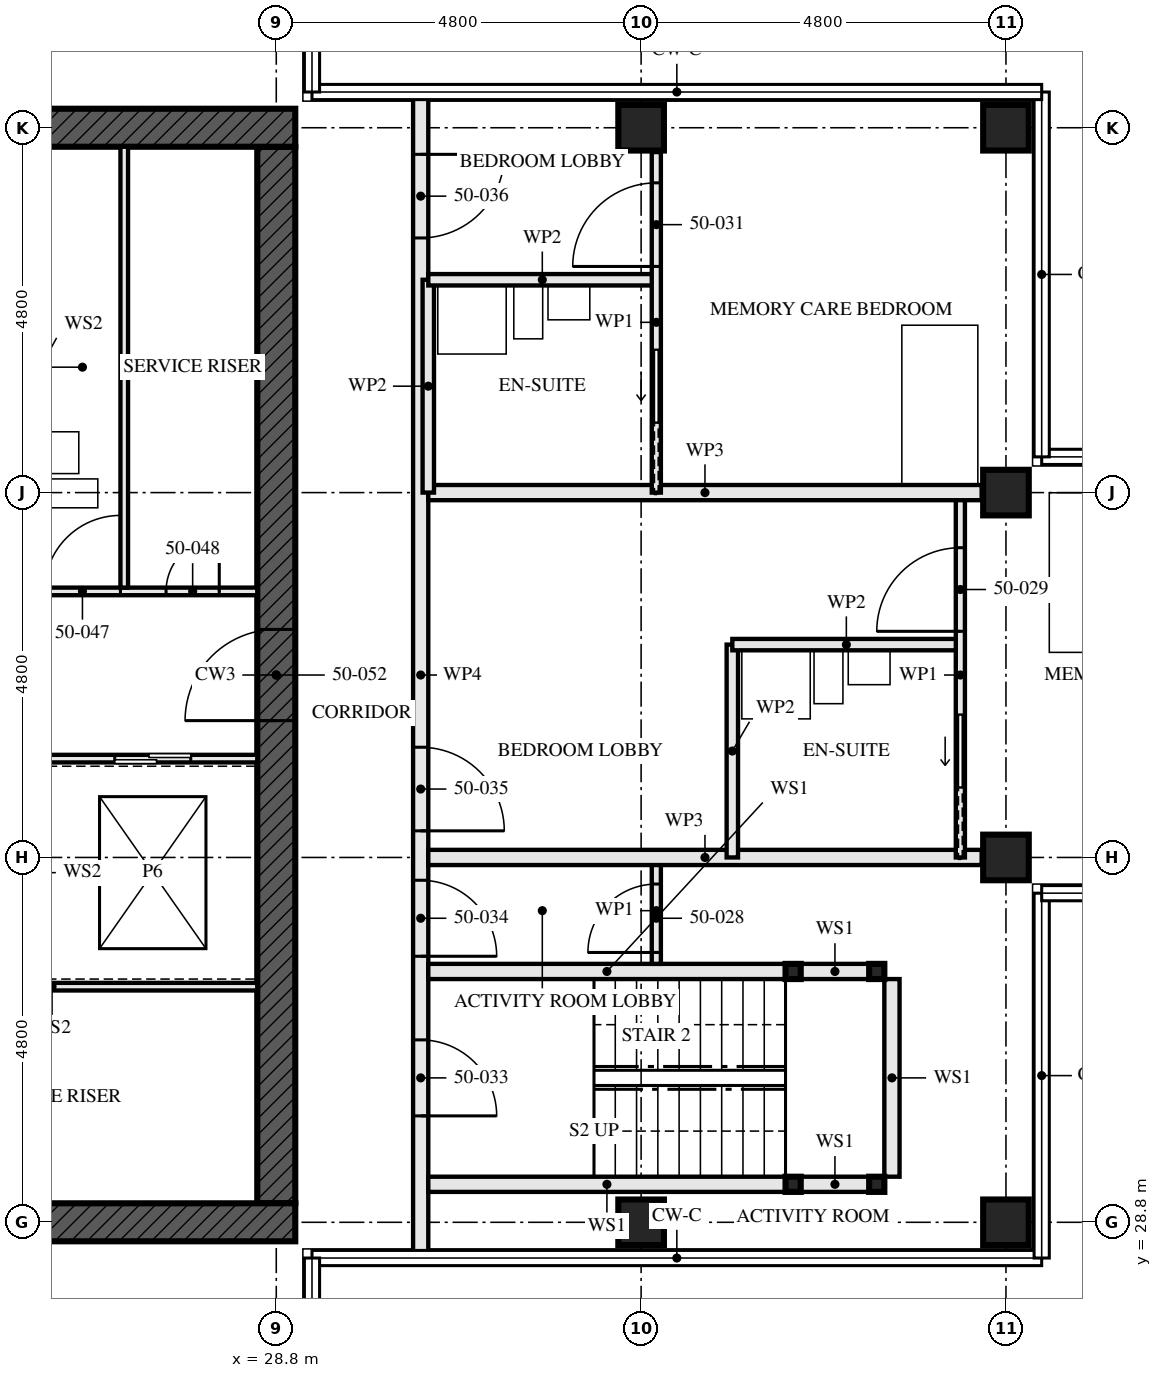
"""IFC4 building model, lengths in metres.
Left out: names, types, materials, properties, quantities, classifications, styles, units other than length and angle.
Written with IfcOpenShell. Run it as: python <this file> out.ifc"""

import sys

from ifc_helpers import new_model, si_unit, direction, frame, frame_2d, origin, origin_2d, place, context, subcontext, project, spatial, rectangle, hollow_rectangle, extrude, element, fill, save


model = new_model("IFC4")
c1 = context("Model", 3, precision=1e-05, world=origin(), true_north=direction((0.0, 1.0)))
c2 = subcontext(c1, "Body", "Model", "MODEL_VIEW")
j1 = project(units=[si_unit("LENGTHUNIT", "METRE"), si_unit("PLANEANGLEUNIT", "RADIAN")], contexts=[c1])
p1 = place(None, origin())
s1 = spatial("IfcSite", under=j1, at=p1, CompositionType="ELEMENT")
p2 = place(p1, origin())
s2 = spatial("IfcBuilding", under=s1, at=p2, CompositionType="ELEMENT")
p3 = place(p2, frame((0.0, 0.0, 183.0)))
s3 = spatial("IfcBuildingStorey", under=s2, at=p3, CompositionType="ELEMENT", Elevation=183.0)
for number, where, z_axis, x_axis in (
    (1, (33.6, 28.8, 0.0), (0.0, 0.0, 1.0), (0.0, 1.0, 0.0)),
    (2, (33.6, 43.2, 0.0), (0.0, 0.0, 1.0), (0.0, 1.0, 0.0)),
    (3, (38.4, 28.8, 0.0), (0.0, 0.0, 1.0), (0.0, 1.0, 0.0)),
    (4, (38.4, 33.6, 0.0), (0.0, 0.0, 1.0), (0.0, 1.0, 0.0)),
    (5, (38.4, 38.4, 0.0), (0.0, 0.0, 1.0), (0.0, 1.0, 0.0)),
    (6, (38.4, 43.2, 0.0), (0.0, 0.0, 1.0), (0.0, 1.0, 0.0)),
):
    element("IfcColumn", number, at=place(p3, frame(where, z_axis=z_axis, x_axis=x_axis)), inside=s3, PredefinedType="COLUMN", context=c2, shape_type="SweptSolid", body=[
        extrude(hollow_rectangle(XDim=0.6, YDim=0.6, WallThickness=0.08, at=origin_2d()), origin(), (0.0, 0.0, 1.0), 3.5),
    ])
p4 = place(p3, frame((14.15, 28.8, -0.17), z_axis=(0.0, 0.0, 1.0), x_axis=(1.0, 0.0, 0.0)))
e7 = element("IfcWall", 7, at=p4, inside=s3, PredefinedType="SHEAR", context=c2, shape_type="SweptSolid", body=[
    extrude(rectangle(XDim=14.9, YDim=0.5, at=frame_2d((7.45, 0.0))), origin(), (0.0, 0.0, 1.0), 3.5),
])
p5 = place(p4, frame((6.85, 0.0, 0.17)))
e8 = element("IfcOpeningElement", 8, at=p5, cuts=e7, PredefinedType="OPENING", context=c2, shape_type="SweptSolid", body=[
    extrude(rectangle(XDim=1.2, YDim=2.1, at=frame_2d((0.6, 1.05))), frame((0.0, 0.26, 0.0), z_axis=(0.0, -1.0, 0.0), x_axis=(1.0, 0.0, 0.0)), (0.0, 0.0, 1.0), 0.521),
])
p6 = place(p3, frame((29.05, 43.2, -0.17), z_axis=(0.0, 0.0, 1.0), x_axis=(-1.0, 0.0, 0.0)))
e9 = element("IfcWall", 9, at=p6, inside=s3, PredefinedType="SHEAR", context=c2, shape_type="SweptSolid", body=[
    extrude(rectangle(XDim=14.9, YDim=0.5, at=frame_2d((7.45, 0.0))), origin(), (0.0, 0.0, 1.0), 3.5),
])
p7 = place(p6, frame((6.85, 0.0, 0.17)))
e10 = element("IfcOpeningElement", 10, at=p7, cuts=e9, PredefinedType="OPENING", context=c2, shape_type="SweptSolid", body=[
    extrude(rectangle(XDim=1.2, YDim=2.1, at=frame_2d((0.6, 1.05))), frame((0.0, 0.26, 0.0), z_axis=(0.0, -1.0, 0.0), x_axis=(1.0, 0.0, 0.0)), (0.0, 0.0, 1.0), 0.521),
])
p8 = place(p3, frame((28.8, 29.05, -0.17), z_axis=(0.0, 0.0, 1.0), x_axis=(0.0, 1.0, 0.0)))
e11 = element("IfcWall", 11, at=p8, inside=s3, PredefinedType="SHEAR", context=c2, shape_type="SweptSolid", body=[
    extrude(rectangle(XDim=13.9, YDim=0.5, at=frame_2d((6.95, 0.0))), origin(), (0.0, 0.0, 1.0), 3.5),
])
p9 = place(p8, frame((6.35, 0.0, 0.17)))
e12 = element("IfcOpeningElement", 12, at=p9, cuts=e11, PredefinedType="OPENING", context=c2, shape_type="SweptSolid", body=[
    extrude(rectangle(XDim=1.2, YDim=2.1, at=frame_2d((0.6, 1.05))), frame((0.0, 0.26, 0.0), z_axis=(0.0, -1.0, 0.0), x_axis=(1.0, 0.0, 0.0)), (0.0, 0.0, 1.0), 0.521),
])
for number, where, z_axis, x_axis in (
    (13, (36.7, 29.3, 0.0), (0.0, 0.0, 1.0), (1.0, 0.0, 0.0)),
    (14, (36.7, 32.1, 0.0), (0.0, 0.0, 1.0), (1.0, 0.0, 0.0)),
    (15, (35.6, 29.3, 0.0), (0.0, 0.0, 1.0), (1.0, 0.0, 0.0)),
    (16, (35.6, 32.1, 0.0), (0.0, 0.0, 1.0), (1.0, 0.0, 0.0)),
):
    element("IfcColumn", number, at=place(p3, frame(where, z_axis=z_axis, x_axis=x_axis)), inside=s3, PredefinedType="COLUMN", context=c2, shape_type="SweptSolid", body=[
        extrude(hollow_rectangle(XDim=0.2, YDim=0.2, WallThickness=0.008, at=origin_2d()), origin(), (0.0, 0.0, 1.0), 3.33),
    ])
p10 = place(p3, frame((36.6, 29.3, 0.0), z_axis=(0.0, 0.0, 1.0), x_axis=(-1.0, 0.0, 0.0)))
e17 = element("IfcWall", 17, at=p10, inside=s3, PredefinedType="SOLIDWALL", context=c2, shape_type="SweptSolid", body=[
    extrude(rectangle(XDim=0.9, YDim=0.2, at=frame_2d((0.45, 0.0))), origin(), (0.0, 0.0, 1.0), 2.99),
])
p11 = place(p3, frame((35.5, 29.3, 0.0), z_axis=(0.0, 0.0, 1.0), x_axis=(-1.0, 0.0, 0.0)))
e18 = element("IfcWall", 18, at=p11, inside=s3, PredefinedType="SOLIDWALL", context=c2, shape_type="SweptSolid", body=[
    extrude(rectangle(XDim=4.7, YDim=0.2, at=frame_2d((2.35, 0.0))), origin(), (0.0, 0.0, 1.0), 2.99),
])
p12 = place(p3, frame((36.6, 32.1, 0.0), z_axis=(0.0, 0.0, 1.0), x_axis=(-1.0, 0.0, 0.0)))
e19 = element("IfcWall", 19, at=p12, inside=s3, PredefinedType="SOLIDWALL", context=c2, shape_type="SweptSolid", body=[
    extrude(rectangle(XDim=0.9, YDim=0.2, at=frame_2d((0.45, 0.0))), origin(), (0.0, 0.0, 1.0), 2.99),
])
p13 = place(p3, frame((35.5, 32.1, 0.0), z_axis=(0.0, 0.0, 1.0), x_axis=(-1.0, 0.0, 0.0)))
e20 = element("IfcWall", 20, at=p13, inside=s3, PredefinedType="SOLIDWALL", context=c2, shape_type="SweptSolid", body=[
    extrude(rectangle(XDim=4.7, YDim=0.2, at=frame_2d((2.35, 0.0))), origin(), (0.0, 0.0, 1.0), 2.99),
])
p14 = place(p3, frame((36.9, 29.4, 0.0), z_axis=(0.0, 0.0, 1.0), x_axis=(0.0, 1.0, 0.0)))
e21 = element("IfcWall", 21, at=p14, inside=s3, PredefinedType="SOLIDWALL", context=c2, shape_type="SweptSolid", body=[
    extrude(rectangle(XDim=2.6, YDim=0.2, at=frame_2d((1.3, 0.0))), origin(), (0.0, 0.0, 1.0), 3.33),
])
p15 = place(p3, frame((33.8, 32.2, 0.0), z_axis=(0.0, 0.0, 1.0), x_axis=(0.0, 1.0, 0.0)))
e22 = element("IfcWall", 22, at=p15, inside=s3, PredefinedType="PARTITIONING", context=c2, shape_type="SweptSolid", body=[
    extrude(rectangle(XDim=1.4, YDim=0.12, at=frame_2d((0.7, 0.0))), origin(), (0.0, 0.0, 1.0), 3.33),
])
p16 = place(p15, frame((0.15, 0.0, 0.0)))
e23 = element("IfcOpeningElement", 23, at=p16, cuts=e22, PredefinedType="OPENING", context=c2, shape_type="SweptSolid", body=[
    extrude(rectangle(XDim=0.9, YDim=2.1, at=frame_2d((0.45, 1.05))), frame((0.0, 0.071, 0.0), z_axis=(0.0, -1.0, 0.0), x_axis=(1.0, 0.0, 0.0)), (0.0, 0.0, 1.0), 0.141),
])
p17 = place(p3, frame((38.08, 33.6, 0.0), z_axis=(0.0, 0.0, 1.0), x_axis=(-1.0, 0.0, 0.0)))
e24 = element("IfcWall", 24, at=p17, inside=s3, PredefinedType="PARTITIONING", context=c2, shape_type="SweptSolid", body=[
    extrude(rectangle(XDim=7.28, YDim=0.2, at=frame_2d((3.64, 0.0))), origin(), (0.0, 0.0, 1.0), 2.55),
])
p18 = place(p3, frame((37.8, 36.4, 0.0), z_axis=(0.0, 0.0, 1.0), x_axis=(-1.0, 0.0, 0.0)))
e25 = element("IfcWall", 25, at=p18, inside=s3, PredefinedType="PARTITIONING", context=c2, shape_type="SweptSolid", body=[
    extrude(rectangle(XDim=3.0, YDim=0.15, at=frame_2d((1.5, 0.0))), origin(), (0.0, 0.0, 1.0), 3.33),
])
p19 = place(p3, frame((34.8, 33.6, 0.0), z_axis=(0.0, 0.0, 1.0), x_axis=(0.0, 1.0, 0.0)))
e26 = element("IfcWall", 26, at=p19, inside=s3, PredefinedType="PARTITIONING", context=c2, shape_type="SweptSolid", body=[
    extrude(rectangle(XDim=2.8, YDim=0.15, at=frame_2d((1.4, 0.0))), origin(), (0.0, 0.0, 1.0), 3.33),
])
p20 = place(p3, frame((37.8, 33.6, 0.0), z_axis=(0.0, 0.0, 1.0), x_axis=(0.0, 1.0, 0.0)))
e27 = element("IfcWall", 27, at=p20, inside=s3, PredefinedType="PARTITIONING", context=c2, shape_type="SweptSolid", body=[
    extrude(rectangle(XDim=4.8, YDim=0.12, at=frame_2d((2.4, 0.0))), origin(), (0.0, 0.0, 1.0), 3.33),
])
p21 = place(p20, frame((2.975, 0.0, 0.0)))
e28 = element("IfcOpeningElement", 28, at=p21, cuts=e27, PredefinedType="OPENING", context=c2, shape_type="SweptSolid", body=[
    extrude(rectangle(XDim=1.1, YDim=2.1, at=frame_2d((0.55, 1.05))), frame((0.0, 0.071, 0.0), z_axis=(0.0, -1.0, 0.0), x_axis=(1.0, 0.0, 0.0)), (0.0, 0.0, 1.0), 0.141),
])
p22 = place(p20, frame((0.925, 0.0, 0.0)))
e29 = element("IfcOpeningElement", 29, at=p22, cuts=e27, PredefinedType="OPENING", context=c2, shape_type="SweptSolid", body=[
    extrude(rectangle(XDim=0.95, YDim=2.1, at=frame_2d((0.475, 1.05))), frame((0.0, 0.071, 0.0), z_axis=(0.0, -1.0, 0.0), x_axis=(1.0, 0.0, 0.0)), (0.0, 0.0, 1.0), 0.141),
])
p23 = place(p3, frame((38.08, 38.4, 0.0), z_axis=(0.0, 0.0, 1.0), x_axis=(-1.0, 0.0, 0.0)))
e30 = element("IfcWall", 30, at=p23, inside=s3, PredefinedType="PARTITIONING", context=c2, shape_type="SweptSolid", body=[
    extrude(rectangle(XDim=7.28, YDim=0.2, at=frame_2d((3.64, 0.0))), origin(), (0.0, 0.0, 1.0), 2.55),
])
p24 = place(p3, frame((33.8, 41.2, 0.0), z_axis=(0.0, 0.0, 1.0), x_axis=(-1.0, 0.0, 0.0)))
e31 = element("IfcWall", 31, at=p24, inside=s3, PredefinedType="PARTITIONING", context=c2, shape_type="SweptSolid", body=[
    extrude(rectangle(XDim=3.0, YDim=0.15, at=frame_2d((1.5, 0.0))), origin(), (0.0, 0.0, 1.0), 3.33),
])
p25 = place(p3, frame((30.8, 38.4, 0.0), z_axis=(0.0, 0.0, 1.0), x_axis=(0.0, 1.0, 0.0)))
e32 = element("IfcWall", 32, at=p25, inside=s3, PredefinedType="PARTITIONING", context=c2, shape_type="SweptSolid", body=[
    extrude(rectangle(XDim=2.8, YDim=0.15, at=frame_2d((1.4, 0.0))), origin(), (0.0, 0.0, 1.0), 3.33),
])
p26 = place(p3, frame((33.8, 38.4, 0.0), z_axis=(0.0, 0.0, 1.0), x_axis=(0.0, 1.0, 0.0)))
e33 = element("IfcWall", 33, at=p26, inside=s3, PredefinedType="PARTITIONING", context=c2, shape_type="SweptSolid", body=[
    extrude(rectangle(XDim=4.48, YDim=0.12, at=frame_2d((2.24, 0.0))), origin(), (0.0, 0.0, 1.0), 3.33),
])
p27 = place(p26, frame((2.975, 0.0, 0.0)))
e34 = element("IfcOpeningElement", 34, at=p27, cuts=e33, PredefinedType="OPENING", context=c2, shape_type="SweptSolid", body=[
    extrude(rectangle(XDim=1.1, YDim=2.1, at=frame_2d((0.55, 1.05))), frame((0.0, 0.071, 0.0), z_axis=(0.0, -1.0, 0.0), x_axis=(1.0, 0.0, 0.0)), (0.0, 0.0, 1.0), 0.141),
])
p28 = place(p26, frame((0.925, 0.0, 0.0)))
e35 = element("IfcOpeningElement", 35, at=p28, cuts=e33, PredefinedType="OPENING", context=c2, shape_type="SweptSolid", body=[
    extrude(rectangle(XDim=0.95, YDim=2.1, at=frame_2d((0.475, 1.05))), frame((0.0, 0.071, 0.0), z_axis=(0.0, -1.0, 0.0), x_axis=(1.0, 0.0, 0.0)), (0.0, 0.0, 1.0), 0.141),
])
p29 = place(p3, frame((30.7, 28.35, 0.0), z_axis=(0.0, 0.0, 1.0), x_axis=(0.0, 1.0, 0.0)))
e36 = element("IfcWall", 36, at=p29, inside=s3, PredefinedType="PARTITIONING", context=c2, shape_type="SweptSolid", body=[
    extrude(rectangle(XDim=15.3, YDim=0.2, at=frame_2d((7.65, 0.0))), origin(), (0.0, 0.0, 1.0), 2.32),
])
p30 = place(p29, frame((1.85, 0.0, 0.0)))
e37 = element("IfcOpeningElement", 37, at=p30, cuts=e36, PredefinedType="OPENING", context=c2, shape_type="SweptSolid", body=[
    extrude(rectangle(XDim=1.0, YDim=2.1, at=frame_2d((0.5, 1.05))), frame((0.0, 0.111, 0.0), z_axis=(0.0, -1.0, 0.0), x_axis=(1.0, 0.0, 0.0)), (0.0, 0.0, 1.0), 0.221),
])
p31 = place(p29, frame((3.95, 0.0, 0.0)))
e38 = element("IfcOpeningElement", 38, at=p31, cuts=e36, PredefinedType="OPENING", context=c2, shape_type="SweptSolid", body=[
    extrude(rectangle(XDim=1.0, YDim=2.1, at=frame_2d((0.5, 1.05))), frame((0.0, 0.111, 0.0), z_axis=(0.0, -1.0, 0.0), x_axis=(1.0, 0.0, 0.0)), (0.0, 0.0, 1.0), 0.221),
])
p32 = place(p29, frame((5.6, 0.0, 0.0)))
e39 = element("IfcOpeningElement", 39, at=p32, cuts=e36, PredefinedType="OPENING", context=c2, shape_type="SweptSolid", body=[
    extrude(rectangle(XDim=1.1, YDim=2.1, at=frame_2d((0.55, 1.05))), frame((0.0, 0.111, 0.0), z_axis=(0.0, -1.0, 0.0), x_axis=(1.0, 0.0, 0.0)), (0.0, 0.0, 1.0), 0.221),
])
p33 = place(p29, frame((13.4, 0.0, 0.0)))
e40 = element("IfcOpeningElement", 40, at=p33, cuts=e36, PredefinedType="OPENING", context=c2, shape_type="SweptSolid", body=[
    extrude(rectangle(XDim=1.1, YDim=2.1, at=frame_2d((0.55, 1.05))), frame((0.0, 0.111, 0.0), z_axis=(0.0, -1.0, 0.0), x_axis=(1.0, 0.0, 0.0)), (0.0, 0.0, 1.0), 0.221),
])
p34 = place(p3, frame((26.8, 37.15, 0.0), z_axis=(0.0, 0.0, 1.0), x_axis=(0.0, 1.0, 0.0)))
e41 = element("IfcWall", 41, at=p34, inside=s3, PredefinedType="SOLIDWALL", context=c2, shape_type="SweptSolid", body=[
    extrude(rectangle(XDim=5.8, YDim=0.1, at=frame_2d((2.9, 0.0))), origin(), (0.0, 0.0, 1.0), 3.33),
])
p35 = place(p3, frame((23.05, 34.9, 0.0), z_axis=(0.0, 0.0, 1.0), x_axis=(1.0, 0.0, 0.0)))
e42 = element("IfcWall", 42, at=p35, inside=s3, PredefinedType="SOLIDWALL", context=c2, shape_type="SweptSolid", body=[
    extrude(rectangle(XDim=5.5, YDim=0.1, at=frame_2d((2.75, 0.0))), origin(), (0.0, 0.0, 1.0), 3.33),
])
p36 = place(p35, frame((0.85, 0.0, 0.0)))
e43 = element("IfcOpeningElement", 43, at=p36, cuts=e42, PredefinedType="OPENING", context=c2, shape_type="SweptSolid", body=[
    extrude(rectangle(XDim=1.0, YDim=2.1, at=frame_2d((0.5, 1.05))), frame((0.0, 0.061, 0.0), z_axis=(0.0, -1.0, 0.0), x_axis=(1.0, 0.0, 0.0)), (0.0, 0.0, 1.0), 0.121),
])
p37 = place(p35, frame((3.625, 0.0, 0.0)))
e44 = element("IfcOpeningElement", 44, at=p37, cuts=e42, PredefinedType="OPENING", context=c2, shape_type="SweptSolid", body=[
    extrude(rectangle(XDim=1.0, YDim=2.1, at=frame_2d((0.5, 1.05))), frame((0.0, 0.061, 0.0), z_axis=(0.0, -1.0, 0.0), x_axis=(1.0, 0.0, 0.0)), (0.0, 0.0, 1.0), 0.121),
])
p38 = place(p3, frame((22.65, 37.1, 0.0), z_axis=(0.0, 0.0, 1.0), x_axis=(1.0, 0.0, 0.0)))
e45 = element("IfcWall", 45, at=p38, inside=s3, PredefinedType="SOLIDWALL", context=c2, shape_type="SweptSolid", body=[
    extrude(rectangle(XDim=5.9, YDim=0.1, at=frame_2d((2.95, 0.0))), origin(), (0.0, 0.0, 1.0), 3.33),
])
p39 = place(p38, frame((3.1, 0.0, 0.0)))
e46 = element("IfcOpeningElement", 46, at=p39, cuts=e45, PredefinedType="OPENING", context=c2, shape_type="SweptSolid", body=[
    extrude(rectangle(XDim=1.0, YDim=2.1, at=frame_2d((0.5, 1.05))), frame((0.0, 0.061, 0.0), z_axis=(0.0, -1.0, 0.0), x_axis=(1.0, 0.0, 0.0)), (0.0, 0.0, 1.0), 0.121),
])
p40 = place(p38, frame((4.7, 0.0, 0.0)))
e47 = element("IfcOpeningElement", 47, at=p40, cuts=e45, PredefinedType="OPENING", context=c2, shape_type="SweptSolid", body=[
    extrude(rectangle(XDim=0.7, YDim=2.1, at=frame_2d((0.35, 1.05))), frame((0.0, 0.061, 0.0), z_axis=(0.0, -1.0, 0.0), x_axis=(1.0, 0.0, 0.0)), (0.0, 0.0, 1.0), 0.121),
])
p41 = place(p3, frame((23.15, 31.9, 0.0), z_axis=(0.0, 0.0, 1.0), x_axis=(1.0, 0.0, 0.0)))
e48 = element("IfcWall", 48, at=p41, inside=s3, PredefinedType="SOLIDWALL", context=c2, shape_type="SweptSolid", body=[
    extrude(rectangle(XDim=5.4, YDim=0.1, at=frame_2d((2.7, 0.0))), origin(), (0.0, 0.0, 1.0), 3.33),
])
p42 = place(p16, origin())
e49 = element("IfcDoor", 49, at=p42, inside=s3, OperationType="SINGLE_SWING_RIGHT", PredefinedType="DOOR", context=c2, shape_type="SweptSolid", body=[
    extrude(rectangle(XDim=0.9, YDim=2.1, at=frame_2d((0.45, 1.05))), frame((0.0, 0.022, 0.0), z_axis=(0.0, -1.0, 0.0), x_axis=(1.0, 0.0, 0.0)), (0.0, 0.0, 1.0), 0.044),
])
fill(e23, e49)
p43 = place(p21, origin())
e50 = element("IfcDoor", 50, at=p43, inside=s3, OperationType="SINGLE_SWING_RIGHT", PredefinedType="DOOR", context=c2, shape_type="SweptSolid", body=[
    extrude(rectangle(XDim=1.1, YDim=2.1, at=frame_2d((0.55, 1.05))), frame((0.0, 0.022, 0.0), z_axis=(0.0, -1.0, 0.0), x_axis=(1.0, 0.0, 0.0)), (0.0, 0.0, 1.0), 0.044),
])
fill(e28, e50)
p44 = place(p22, origin())
e51 = element("IfcDoor", 51, at=p44, inside=s3, OperationType="SLIDING_TO_RIGHT", PredefinedType="DOOR", context=c2, shape_type="SweptSolid", body=[
    extrude(rectangle(XDim=0.95, YDim=2.1, at=frame_2d((0.475, 1.05))), frame((0.0, 0.022, 0.0), z_axis=(0.0, -1.0, 0.0), x_axis=(1.0, 0.0, 0.0)), (0.0, 0.0, 1.0), 0.044),
])
fill(e29, e51)
p45 = place(p27, origin())
e52 = element("IfcDoor", 52, at=p45, inside=s3, OperationType="SINGLE_SWING_RIGHT", PredefinedType="DOOR", context=c2, shape_type="SweptSolid", body=[
    extrude(rectangle(XDim=1.1, YDim=2.1, at=frame_2d((0.55, 1.05))), frame((0.0, 0.022, 0.0), z_axis=(0.0, -1.0, 0.0), x_axis=(1.0, 0.0, 0.0)), (0.0, 0.0, 1.0), 0.044),
])
fill(e34, e52)
p46 = place(p28, origin())
e53 = element("IfcDoor", 53, at=p46, inside=s3, OperationType="SLIDING_TO_RIGHT", PredefinedType="DOOR", context=c2, shape_type="SweptSolid", body=[
    extrude(rectangle(XDim=0.95, YDim=2.1, at=frame_2d((0.475, 1.05))), frame((0.0, 0.022, 0.0), z_axis=(0.0, -1.0, 0.0), x_axis=(1.0, 0.0, 0.0)), (0.0, 0.0, 1.0), 0.044),
])
fill(e35, e53)
p47 = place(p30, frame((1.0, 0.0, 0.0), z_axis=(0.0, 0.0, 1.0), x_axis=(-1.0, 0.0, 0.0)))
e54 = element("IfcDoor", 54, at=p47, inside=s3, OperationType="SINGLE_SWING_LEFT", PredefinedType="DOOR", context=c2, shape_type="SweptSolid", body=[
    extrude(rectangle(XDim=1.0, YDim=2.1, at=frame_2d((0.5, 1.05))), frame((0.0, 0.032, 0.0), z_axis=(0.0, -1.0, 0.0), x_axis=(1.0, 0.0, 0.0)), (0.0, 0.0, 1.0), 0.064),
])
fill(e37, e54)
p48 = place(p31, frame((1.0, 0.0, 0.0), z_axis=(0.0, 0.0, 1.0), x_axis=(-1.0, 0.0, 0.0)))
e55 = element("IfcDoor", 55, at=p48, inside=s3, OperationType="SINGLE_SWING_LEFT", PredefinedType="DOOR", context=c2, shape_type="SweptSolid", body=[
    extrude(rectangle(XDim=1.0, YDim=2.1, at=frame_2d((0.5, 1.05))), frame((0.0, 0.027, 0.0), z_axis=(0.0, -1.0, 0.0), x_axis=(1.0, 0.0, 0.0)), (0.0, 0.0, 1.0), 0.054),
])
fill(e38, e55)
p49 = place(p32, frame((1.1, 0.0, 0.0), z_axis=(0.0, 0.0, 1.0), x_axis=(-1.0, 0.0, 0.0)))
e56 = element("IfcDoor", 56, at=p49, inside=s3, OperationType="SINGLE_SWING_LEFT", PredefinedType="DOOR", context=c2, shape_type="SweptSolid", body=[
    extrude(rectangle(XDim=1.1, YDim=2.1, at=frame_2d((0.55, 1.05))), frame((0.0, 0.027, 0.0), z_axis=(0.0, -1.0, 0.0), x_axis=(1.0, 0.0, 0.0)), (0.0, 0.0, 1.0), 0.054),
])
fill(e39, e56)
p50 = place(p33, frame((1.1, 0.0, 0.0), z_axis=(0.0, 0.0, 1.0), x_axis=(-1.0, 0.0, 0.0)))
e57 = element("IfcDoor", 57, at=p50, inside=s3, OperationType="SINGLE_SWING_RIGHT", PredefinedType="DOOR", context=c2, shape_type="SweptSolid", body=[
    extrude(rectangle(XDim=1.1, YDim=2.1, at=frame_2d((0.55, 1.05))), frame((0.0, 0.027, 0.0), z_axis=(0.0, -1.0, 0.0), x_axis=(1.0, 0.0, 0.0)), (0.0, 0.0, 1.0), 0.054),
])
fill(e40, e57)
p51 = place(p37, origin())
e58 = element("IfcDoor", 58, at=p51, inside=s3, OperationType="SLIDING_TO_LEFT", PredefinedType="DOOR", context=c2, shape_type="SweptSolid", body=[
    extrude(rectangle(XDim=1.0, YDim=2.1, at=frame_2d((0.5, 1.05))), frame((0.0, 0.05, 0.0), z_axis=(0.0, -1.0, 0.0), x_axis=(1.0, 0.0, 0.0)), (0.0, 0.0, 1.0), 0.1),
])
fill(e44, e58)
p52 = place(p39, origin())
e59 = element("IfcDoor", 59, at=p52, inside=s3, OperationType="SINGLE_SWING_LEFT", PredefinedType="DOOR", context=c2, shape_type="SweptSolid", body=[
    extrude(rectangle(XDim=1.0, YDim=2.1, at=frame_2d((0.5, 1.05))), frame((0.0, 0.027, 0.0), z_axis=(0.0, -1.0, 0.0), x_axis=(1.0, 0.0, 0.0)), (0.0, 0.0, 1.0), 0.054),
])
fill(e46, e59)
p53 = place(p40, origin())
e60 = element("IfcDoor", 60, at=p53, inside=s3, OperationType="SINGLE_SWING_LEFT", PredefinedType="DOOR", context=c2, shape_type="SweptSolid", body=[
    extrude(rectangle(XDim=0.7, YDim=2.1, at=frame_2d((0.35, 1.05))), frame((0.0, 0.027, 0.0), z_axis=(0.0, -1.0, 0.0), x_axis=(1.0, 0.0, 0.0)), (0.0, 0.0, 1.0), 0.054),
])
fill(e47, e60)
p54 = place(p9, origin())
e61 = element("IfcDoor", 61, at=p54, inside=s3, OperationType="SINGLE_SWING_LEFT", PredefinedType="DOOR", context=c2, shape_type="SweptSolid", body=[
    extrude(rectangle(XDim=1.2, YDim=2.1, at=frame_2d((0.6, 1.05))), frame((0.0, 0.027, 0.0), z_axis=(0.0, -1.0, 0.0), x_axis=(1.0, 0.0, 0.0)), (0.0, 0.0, 1.0), 0.054),
])
fill(e12, e61)
save(model, sys.argv[1])
